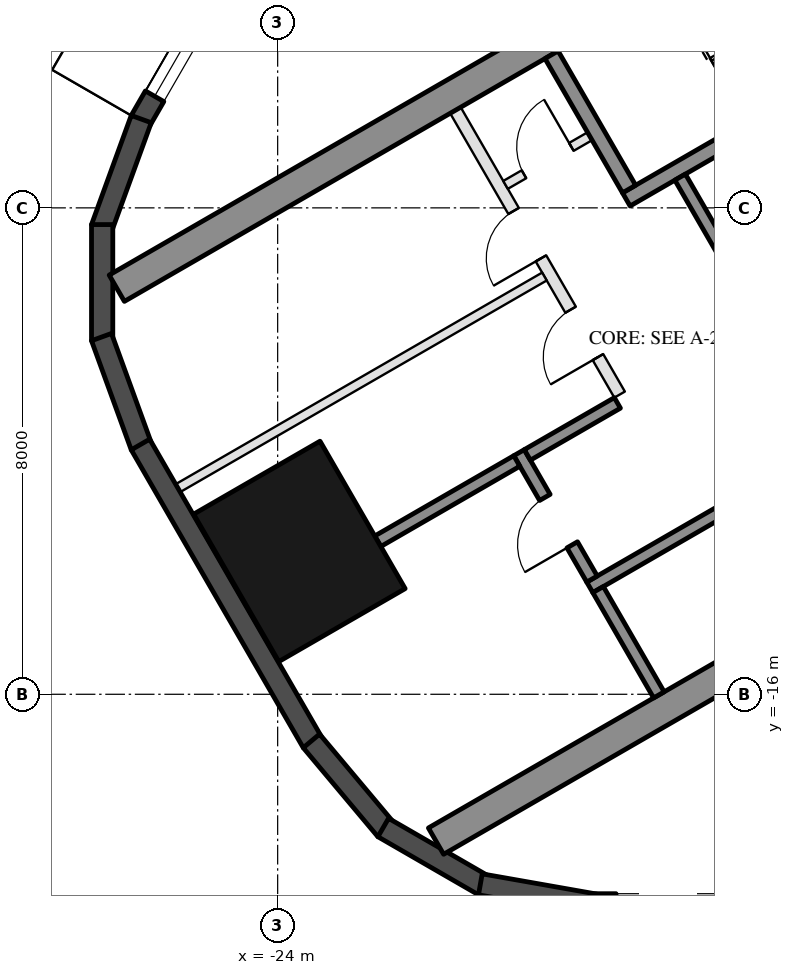
"""IFC4 building model, lengths in metres.
Left out: names, types, materials, properties, quantities, classifications, styles, units other than length and angle.
Written with IfcOpenShell. Run it as: python <this file> out.ifc"""

import sys

from ifc_helpers import new_model, si_unit, direction, frame, frame_2d, origin, origin_2d, place, context, subcontext, project, spatial, rectangle, hollow_rectangle, extrude, element, fill, save


model = new_model("IFC4")
c1 = context("Model", 3, precision=1e-05, world=origin(), true_north=direction((0.0, 1.0)))
c2 = subcontext(c1, "Body", "Model", "MODEL_VIEW")
j1 = project(units=[si_unit("LENGTHUNIT", "METRE"), si_unit("PLANEANGLEUNIT", "RADIAN")], contexts=[c1])
p1 = place(None, origin())
s1 = spatial("IfcSite", under=j1, at=p1, CompositionType="ELEMENT")
p2 = place(p1, origin())
s2 = spatial("IfcBuilding", under=s1, at=p2, CompositionType="ELEMENT")
p3 = place(p2, frame((0.0, 0.0, 76.1)))
s3 = spatial("IfcBuildingStorey", under=s2, at=p3, CompositionType="ELEMENT", Elevation=76.1)
p4 = place(p3, frame((-23.643, -13.65, 0.0), z_axis=(0.0, 0.0, 1.0), x_axis=(-0.5, 0.866025403784, 0.0)))
e1 = element("IfcColumn", 1, at=p4, inside=s3, PredefinedType="COLUMN", context=c2, shape_type="SweptSolid", body=[
    extrude(hollow_rectangle(XDim=2.8, YDim=2.4, WallThickness=0.07, at=origin_2d()), origin(), (0.0, 0.0, 1.0), 3.7),
])
p5 = place(p3, frame((-24.299, -3.176, 0.0), z_axis=(0.0, 0.0, 1.0), x_axis=(-0.500028278809, -0.866009076391, 0.0)))
e2 = element("IfcWall", 2, at=p5, inside=s3, PredefinedType="SOLIDWALL", context=c2, shape_type="SweptSolid", body=[
    extrude(rectangle(XDim=3.916, YDim=0.35, at=frame_2d((1.958, 0.0))), origin(), (0.0, 0.0, 1.0), 3.55),
])
p6 = place(p5, frame((1.75, 0.0, 0.3)))
e3 = element("IfcOpeningElement", 3, at=p6, cuts=e2, PredefinedType="OPENING", context=c2, shape_type="SweptSolid", body=[
    extrude(rectangle(XDim=1.7, YDim=2.65, at=frame_2d((0.85, 1.325))), frame((0.0, 0.185, 0.0), z_axis=(0.0, -1.0, 0.0), x_axis=(1.0, 0.0, 0.0)), (0.0, 0.0, 1.0), 0.37),
])
for number, where, z_axis, x_axis in (
    (4, (-26.244, -6.54, 0.0), (0.0, 0.0, 1.0), (-0.342, -0.94, 0.0)),
    (5, (-26.886, -8.275, 0.0), (0.0, 0.0, 1.0), (0.0, -1.0, 0.0)),
    (6, (-26.897, -10.125, 0.0), (0.0, 0.0, 1.0), (0.342, -0.94, 0.0)),
):
    element("IfcWall", number, at=place(p3, frame(where, z_axis=z_axis, x_axis=x_axis)), inside=s3, PredefinedType="SOLIDWALL", context=c2, shape_type="SweptSolid", body=[
        extrude(rectangle(XDim=1.91, YDim=0.35, at=frame_2d((0.955, 0.0))), origin(), (0.0, 0.0, 1.0), 3.55),
    ])
p7 = place(p3, frame((-26.257, -11.893, 0.0), z_axis=(0.0, 0.0, 1.0), x_axis=(0.500018773155, -0.866014564827, 0.0)))
e7 = element("IfcWall", 7, at=p7, inside=s3, PredefinedType="SOLIDWALL", context=c2, shape_type="SweptSolid", body=[
    extrude(rectangle(XDim=5.658, YDim=0.35, at=frame_2d((2.829, 0.0))), origin(), (0.0, 0.0, 1.0), 3.55),
])
for number, where, z_axis, x_axis in (
    (8, (-23.445, -16.768, 0.0), (0.0, 0.0, 1.0), (0.643, -0.766, 0.0)),
    (9, (-22.264, -18.192, 0.0), (0.0, 0.0, 1.0), (0.866, -0.5, 0.0)),
):
    element("IfcWall", number, at=place(p3, frame(where, z_axis=z_axis, x_axis=x_axis)), inside=s3, PredefinedType="SOLIDWALL", context=c2, shape_type="SweptSolid", body=[
        extrude(rectangle(XDim=1.91, YDim=0.35, at=frame_2d((0.955, 0.0))), origin(), (0.0, 0.0, 1.0), 3.55),
    ])
p8 = place(p3, frame((-20.667, -19.126, 0.0), z_axis=(0.0, 0.0, 1.0), x_axis=(0.984798995425, -0.173697837091, 0.0)))
e10 = element("IfcWall", 10, at=p8, inside=s3, PredefinedType="SOLIDWALL", context=c2, shape_type="SweptSolid", body=[
    extrude(rectangle(XDim=1.91, YDim=0.35, at=frame_2d((0.955, 0.0))), origin(), (0.0, 0.0, 1.0), 3.55),
])
p9 = place(p3, frame((-18.816, -19.455, 0.0), z_axis=(0.0, 0.0, 1.0), x_axis=(1.0, 0.0, 0.0)))
e11 = element("IfcWall", 11, at=p9, inside=s3, PredefinedType="SOLIDWALL", context=c2, shape_type="SweptSolid", body=[
    extrude(rectangle(XDim=11.816, YDim=0.35, at=frame_2d((5.908, 0.0))), origin(), (0.0, 0.0, 1.0), 3.55),
])
p10 = place(p9, frame((0.381, 0.0, 0.3)))
e12 = element("IfcOpeningElement", 12, at=p10, cuts=e11, PredefinedType="OPENING", context=c2, shape_type="SweptSolid", body=[
    extrude(rectangle(XDim=1.7, YDim=2.65, at=frame_2d((0.85, 1.325))), frame((0.0, 0.185, 0.0), z_axis=(0.0, -1.0, 0.0), x_axis=(1.0, 0.0, 0.0)), (0.0, 0.0, 1.0), 0.37),
])
p11 = place(p9, frame((7.665, 0.0, 0.0)))
e13 = element("IfcOpeningElement", 13, at=p11, cuts=e11, PredefinedType="OPENING", context=c2, shape_type="SweptSolid", body=[
    extrude(rectangle(XDim=2.4, YDim=2.4, at=frame_2d((1.2, 1.2))), frame((0.0, 0.185, 0.0), z_axis=(0.0, -1.0, 0.0), x_axis=(1.0, 0.0, 0.0)), (0.0, 0.0, 1.0), 0.37),
])
p12 = place(p9, frame((3.866, 0.0, 0.3)))
e14 = element("IfcOpeningElement", 14, at=p12, cuts=e11, PredefinedType="OPENING", context=c2, shape_type="SweptSolid", body=[
    extrude(rectangle(XDim=1.5, YDim=2.65, at=frame_2d((0.75, 1.325))), frame((0.0, 0.185, 0.0), z_axis=(0.0, -1.0, 0.0), x_axis=(1.0, 0.0, 0.0)), (0.0, 0.0, 1.0), 0.37),
])
p13 = place(p9, frame((5.666, 0.0, 0.3)))
e15 = element("IfcOpeningElement", 15, at=p13, cuts=e11, PredefinedType="OPENING", context=c2, shape_type="SweptSolid", body=[
    extrude(rectangle(XDim=1.5, YDim=2.65, at=frame_2d((0.75, 1.325))), frame((0.0, 0.185, 0.0), z_axis=(0.0, -1.0, 0.0), x_axis=(1.0, 0.0, 0.0)), (0.0, 0.0, 1.0), 0.37),
])
for number, where, z_axis, x_axis in (
    (16, (-13.797, -1.903, 0.0), (0.0, 0.0, 1.0), (-0.866, -0.5, 0.0)),
    (17, (-8.547, -10.997, 0.0), (0.0, 0.0, 1.0), (-0.866, -0.5, 0.0)),
):
    element("IfcWall", number, at=place(p3, frame(where, z_axis=z_axis, x_axis=x_axis)), inside=s3, PredefinedType="SHEAR", context=c2, shape_type="SweptSolid", body=[
        extrude(rectangle(XDim=14.837, YDim=0.5, at=frame_2d((7.418, 0.0))), origin(), (0.0, 0.0, 1.0), 3.5),
    ])
p14 = place(p3, frame((-12.681, -4.636, 0.0), z_axis=(0.0, 0.0, 1.0), x_axis=(-0.866021702275, -0.500006411147, 0.0)))
e18 = element("IfcWall", 18, at=p14, inside=s3, PredefinedType="SHEAR", context=c2, shape_type="SweptSolid", body=[
    extrude(rectangle(XDim=6.45, YDim=0.25, at=frame_2d((3.225, 0.0))), origin(), (0.0, 0.0, 1.0), 3.5),
])
p15 = place(p14, frame((0.3, 0.0, 0.0)))
e19 = element("IfcOpeningElement", 19, at=p15, cuts=e18, PredefinedType="OPENING", context=c2, shape_type="SweptSolid", body=[
    extrude(rectangle(XDim=1.0, YDim=2.1, at=frame_2d((0.5, 1.05))), frame((0.0, 0.135, 0.0), z_axis=(0.0, -1.0, 0.0), x_axis=(1.0, 0.0, 0.0)), (0.0, 0.0, 1.0), 0.27),
])
p16 = place(p3, frame((-19.496, -5.482, 0.0), z_axis=(0.0, 0.0, 1.0), x_axis=(0.499990435942, -0.866030925526, 0.0)))
e20 = element("IfcWall", 20, at=p16, inside=s3, PredefinedType="SHEAR", context=c2, shape_type="SweptSolid", body=[
    extrude(rectangle(XDim=2.55, YDim=0.25, at=frame_2d((1.275, 0.0))), origin(), (0.0, 0.0, 1.0), 3.5),
])
p17 = place(p3, frame((-17.381, -7.495, 0.0), z_axis=(0.0, 0.0, 1.0), x_axis=(0.500011755427, -0.866018616679, 0.0)))
e21 = element("IfcWall", 21, at=p17, inside=s3, PredefinedType="SHEAR", context=c2, shape_type="SweptSolid", body=[
    extrude(rectangle(XDim=2.8, YDim=0.2, at=frame_2d((1.4, 0.0))), origin(), (0.0, 0.0, 1.0), 3.5),
])
p18 = place(p3, frame((-10.068, -9.162, 0.0), z_axis=(0.0, 0.0, 1.0), x_axis=(-0.866032725843, -0.499987317609, 0.0)))
e22 = element("IfcWall", 22, at=p18, inside=s3, PredefinedType="SHEAR", context=c2, shape_type="SweptSolid", body=[
    extrude(rectangle(XDim=10.16, YDim=0.2, at=frame_2d((5.08, 0.0))), origin(), (0.0, 0.0, 1.0), 3.5),
])
p19 = place(p18, frame((0.72, 0.0, 0.0)))
e23 = element("IfcOpeningElement", 23, at=p19, cuts=e22, PredefinedType="OPENING", context=c2, shape_type="SweptSolid", body=[
    extrude(rectangle(XDim=0.9, YDim=2.1, at=frame_2d((0.45, 1.05))), frame((0.0, 0.11, 0.0), z_axis=(0.0, -1.0, 0.0), x_axis=(1.0, 0.0, 0.0)), (0.0, 0.0, 1.0), 0.22),
])
p20 = place(p18, frame((5.8, 0.0, 0.0)))
e24 = element("IfcOpeningElement", 24, at=p20, cuts=e22, PredefinedType="OPENING", context=c2, shape_type="SweptSolid", body=[
    extrude(rectangle(XDim=0.9, YDim=2.1, at=frame_2d((0.45, 1.05))), frame((0.0, 0.11, 0.0), z_axis=(0.0, -1.0, 0.0), x_axis=(1.0, 0.0, 0.0)), (0.0, 0.0, 1.0), 0.22),
])
p21 = place(p3, frame((-20.031, -12.026, 0.0), z_axis=(0.0, 0.0, 1.0), x_axis=(0.500033551112, -0.866006032174, 0.0)))
e25 = element("IfcWall", 25, at=p21, inside=s3, PredefinedType="SHEAR", context=c2, shape_type="SweptSolid", body=[
    extrude(rectangle(XDim=2.4, YDim=0.2, at=frame_2d((1.2, 0.0))), origin(), (0.0, 0.0, 1.0), 3.5),
])
p22 = place(p21, frame((0.85, 0.0, 0.0)))
e26 = element("IfcOpeningElement", 26, at=p22, cuts=e25, PredefinedType="OPENING", context=c2, shape_type="SweptSolid", body=[
    extrude(rectangle(XDim=0.9, YDim=2.1, at=frame_2d((0.45, 1.05))), frame((0.0, 0.11, 0.0), z_axis=(0.0, -1.0, 0.0), x_axis=(1.0, 0.0, 0.0)), (0.0, 0.0, 1.0), 0.22),
])
p23 = place(p3, frame((-18.413, -11.208, 0.0), z_axis=(0.0, 0.0, 1.0), x_axis=(-0.866038183914, -0.499977863513, 0.0)))
e27 = element("IfcWall", 27, at=p23, inside=s3, PredefinedType="SHEAR", context=c2, shape_type="SweptSolid", body=[
    extrude(rectangle(XDim=1.71, YDim=0.2, at=frame_2d((0.855, 0.0))), origin(), (0.0, 0.0, 1.0), 3.5),
])
p24 = place(p3, frame((-18.73, -14.278, 0.0), z_axis=(0.0, 0.0, 1.0), x_axis=(0.50002537861, -0.866010750942, 0.0)))
e28 = element("IfcWall", 28, at=p24, inside=s3, PredefinedType="SHEAR", context=c2, shape_type="SweptSolid", body=[
    extrude(rectangle(XDim=2.0, YDim=0.2, at=frame_2d((1.0, 0.0))), origin(), (0.0, 0.0, 1.0), 3.5),
])
p25 = place(p3, frame((-20.067, -12.163, 0.0), z_axis=(0.0, 0.0, 1.0), x_axis=(-0.866060851709, -0.499938597367, 0.0)))
e29 = element("IfcWall", 29, at=p25, inside=s3, PredefinedType="SHEAR", context=c2, shape_type="SweptSolid", body=[
    extrude(rectangle(XDim=2.64, YDim=0.2, at=frame_2d((1.32, 0.0))), origin(), (0.0, 0.0, 1.0), 3.5),
])
p26 = place(p3, frame((-21.076, -6.395, 0.0), z_axis=(0.0, 0.0, 1.0), x_axis=(0.50001468107, -0.866016927499, 0.0)))
e30 = element("IfcWall", 30, at=p26, inside=s3, PredefinedType="PARTITIONING", context=c2, shape_type="SweptSolid", body=[
    extrude(rectangle(XDim=5.4, YDim=0.2, at=frame_2d((2.7, 0.0))), origin(), (0.0, 0.0, 1.0), 3.5),
])
p27 = place(p26, frame((1.913, 0.0, 0.0)))
e31 = element("IfcOpeningElement", 31, at=p27, cuts=e30, PredefinedType="OPENING", context=c2, shape_type="SweptSolid", body=[
    extrude(rectangle(XDim=0.9, YDim=2.1, at=frame_2d((0.45, 1.05))), frame((0.0, 0.11, 0.0), z_axis=(0.0, -1.0, 0.0), x_axis=(1.0, 0.0, 0.0)), (0.0, 0.0, 1.0), 0.22),
])
p28 = place(p26, frame((3.788, 0.0, 0.0)))
e32 = element("IfcOpeningElement", 32, at=p28, cuts=e30, PredefinedType="OPENING", context=c2, shape_type="SweptSolid", body=[
    extrude(rectangle(XDim=0.9, YDim=2.1, at=frame_2d((0.45, 1.05))), frame((0.0, 0.11, 0.0), z_axis=(0.0, -1.0, 0.0), x_axis=(1.0, 0.0, 0.0)), (0.0, 0.0, 1.0), 0.22),
])
p29 = place(p3, frame((-18.866, -6.822, 0.0), z_axis=(0.0, 0.0, 1.0), x_axis=(-0.866028054938, -0.499995408039, 0.0)))
e33 = element("IfcWall", 33, at=p29, inside=s3, PredefinedType="PARTITIONING", context=c2, shape_type="SweptSolid", body=[
    extrude(rectangle(XDim=1.6, YDim=0.15, at=frame_2d((0.8, 0.0))), origin(), (0.0, 0.0, 1.0), 3.5),
])
p30 = place(p29, frame((0.35, 0.0, 0.0)))
e34 = element("IfcOpeningElement", 34, at=p30, cuts=e33, PredefinedType="OPENING", context=c2, shape_type="SweptSolid", body=[
    extrude(rectangle(XDim=0.9, YDim=2.1, at=frame_2d((0.45, 1.05))), frame((0.0, 0.085, 0.0), z_axis=(0.0, -1.0, 0.0), x_axis=(1.0, 0.0, 0.0)), (0.0, 0.0, 1.0), 0.17),
])
p31 = place(p3, frame((-19.613, -9.13, 0.0), z_axis=(0.0, 0.0, 1.0), x_axis=(-0.866031734426, -0.499989034847, 0.0)))
e35 = element("IfcWall", 35, at=p31, inside=s3, PredefinedType="PARTITIONING", context=c2, shape_type="SweptSolid", body=[
    extrude(rectangle(XDim=6.95, YDim=0.15, at=frame_2d((3.475, 0.0))), origin(), (0.0, 0.0, 1.0), 3.5),
])
p32 = place(p6, origin())
e36 = element("IfcWindow", 36, at=p32, inside=s3, PartitioningType="SINGLE_PANEL", PredefinedType="WINDOW", context=c2, shape_type="SweptSolid", body=[
    extrude(rectangle(XDim=1.7, YDim=2.65, at=frame_2d((0.85, 1.325))), frame((0.0, 0.03, 0.0), z_axis=(0.0, -1.0, 0.0), x_axis=(1.0, 0.0, 0.0)), (0.0, 0.0, 1.0), 0.06),
])
fill(e3, e36)
p33 = place(p30, frame((0.9, 0.0, 0.0), z_axis=(0.0, 0.0, 1.0), x_axis=(-1.0, 0.0, 0.0)))
e37 = element("IfcDoor", 37, at=p33, inside=s3, OperationType="SINGLE_SWING_RIGHT", PredefinedType="DOOR", context=c2, shape_type="SweptSolid", body=[
    extrude(rectangle(XDim=0.9, YDim=2.1, at=frame_2d((0.45, 1.05))), frame((0.0, 0.025, 0.0), z_axis=(0.0, -1.0, 0.0), x_axis=(1.0, 0.0, 0.0)), (0.0, 0.0, 1.0), 0.05),
])
fill(e34, e37)
p34 = place(p22, frame((0.9, 0.0, 0.0), z_axis=(0.0, 0.0, 1.0), x_axis=(-1.0, 0.0, 0.0)))
e38 = element("IfcDoor", 38, at=p34, inside=s3, OperationType="SINGLE_SWING_LEFT", PredefinedType="DOOR", context=c2, shape_type="SweptSolid", body=[
    extrude(rectangle(XDim=0.9, YDim=2.1, at=frame_2d((0.45, 1.05))), frame((0.0, 0.025, 0.0), z_axis=(0.0, -1.0, 0.0), x_axis=(1.0, 0.0, 0.0)), (0.0, 0.0, 1.0), 0.05),
])
fill(e26, e38)
p35 = place(p27, frame((0.9, 0.0, 0.0), z_axis=(0.0, 0.0, 1.0), x_axis=(-1.0, 0.0, 0.0)))
e39 = element("IfcDoor", 39, at=p35, inside=s3, OperationType="SINGLE_SWING_LEFT", PredefinedType="DOOR", context=c2, shape_type="SweptSolid", body=[
    extrude(rectangle(XDim=0.9, YDim=2.1, at=frame_2d((0.45, 1.05))), frame((0.0, 0.025, 0.0), z_axis=(0.0, -1.0, 0.0), x_axis=(1.0, 0.0, 0.0)), (0.0, 0.0, 1.0), 0.05),
])
fill(e31, e39)
p36 = place(p28, frame((0.9, 0.0, 0.0), z_axis=(0.0, 0.0, 1.0), x_axis=(-1.0, 0.0, 0.0)))
e40 = element("IfcDoor", 40, at=p36, inside=s3, OperationType="SINGLE_SWING_LEFT", PredefinedType="DOOR", context=c2, shape_type="SweptSolid", body=[
    extrude(rectangle(XDim=0.9, YDim=2.1, at=frame_2d((0.45, 1.05))), frame((0.0, 0.025, 0.0), z_axis=(0.0, -1.0, 0.0), x_axis=(1.0, 0.0, 0.0)), (0.0, 0.0, 1.0), 0.05),
])
fill(e32, e40)
save(model, sys.argv[1])
